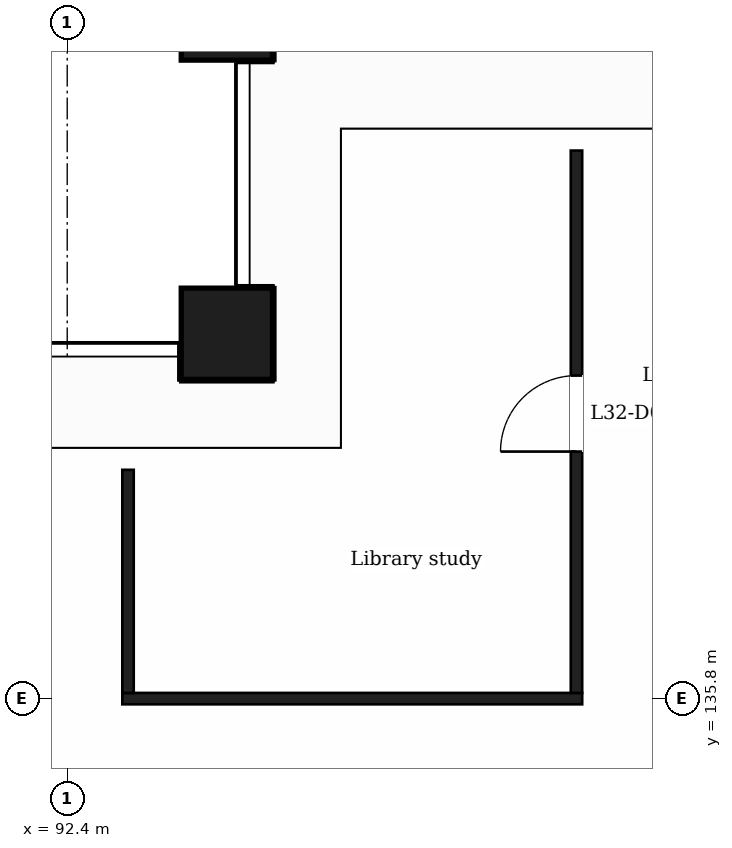
"""IFC4 building model, lengths in metres.
Left out: names, types, materials, properties, quantities, classifications, styles, units other than length and angle.
Written with IfcOpenShell. Run it as: python <this file> out.ifc"""

import sys

from ifc_helpers import new_model, si_unit, direction, frame, frame_2d, origin, origin_2d, place, context, subcontext, project, spatial, rectangle, extrude, element, fill, save


model = new_model("IFC4")
c1 = context("Model", 3, precision=1e-05, world=origin(), true_north=direction((0.0, 1.0)))
c2 = subcontext(c1, "Body", "Model", "MODEL_VIEW")
j1 = project(units=[si_unit("LENGTHUNIT", "METRE"), si_unit("PLANEANGLEUNIT", "RADIAN")], contexts=[c1])
p1 = place(None, origin())
s1 = spatial("IfcSite", under=j1, at=p1, CompositionType="ELEMENT")
p2 = place(p1, origin())
s2 = spatial("IfcBuilding", under=s1, at=p2, CompositionType="ELEMENT")
p3 = place(p2, frame((0.0, 0.0, 135.4)))
s3 = spatial("IfcBuildingStorey", under=s2, at=p3, CompositionType="ELEMENT", Elevation=135.4)
for number, where, z_axis, x_axis in (
    (1, (94.5, 140.6, 0.0), (0.0, 0.0, 1.0), (1.0, 0.0, 0.0)),
    (2, (94.5, 144.8, 0.0), (0.0, 0.0, 1.0), (1.0, 0.0, 0.0)),
):
    element("IfcColumn", number, at=place(p3, frame(where, z_axis=z_axis, x_axis=x_axis)), inside=s3, PredefinedType="COLUMN", context=c2, shape_type="SweptSolid", body=[
        extrude(rectangle(XDim=1.2, YDim=1.2, at=origin_2d()), origin(), (0.0, 0.0, 1.0), 7.4),
    ])
p4 = place(p3, frame((93.125, 135.8, 0.0), z_axis=(0.0, 0.0, 1.0), x_axis=(1.0, 0.0, 0.0)))
e3 = element("IfcWall", 3, at=p4, inside=s3, PredefinedType="PARTITIONING", context=c2, shape_type="SweptSolid", body=[
    extrude(rectangle(XDim=6.05, YDim=0.15, at=frame_2d((3.025, 0.0))), origin(), (0.0, 0.0, 1.0), 6.9),
])
p5 = place(p3, frame((93.2, 135.875, 0.0), z_axis=(0.0, 0.0, 1.0), x_axis=(0.0, 1.0, 0.0)))
e4 = element("IfcWall", 4, at=p5, inside=s3, PredefinedType="PARTITIONING", context=c2, shape_type="SweptSolid", body=[
    extrude(rectangle(XDim=2.935, YDim=0.15, at=frame_2d((1.468, 0.0))), origin(), (0.0, 0.0, 1.0), 6.9),
])
p6 = place(p3, frame((99.1, 135.875, 0.0), z_axis=(0.0, 0.0, 1.0), x_axis=(0.0, 1.0, 0.0)))
e5 = element("IfcWall", 5, at=p6, inside=s3, PredefinedType="PARTITIONING", context=c2, shape_type="SweptSolid", body=[
    extrude(rectangle(XDim=7.135, YDim=0.15, at=frame_2d((3.567, 0.0))), origin(), (0.0, 0.0, 1.0), 6.9),
])
p7 = place(p6, frame((3.175, 0.0, 0.0)))
e6 = element("IfcOpeningElement", 6, at=p7, cuts=e5, PredefinedType="OPENING", context=c2, shape_type="SweptSolid", body=[
    extrude(rectangle(XDim=1.0, YDim=2.1, at=frame_2d((0.5, 1.05))), frame((0.0, 0.085, 0.0), z_axis=(0.0, -1.0, 0.0), x_axis=(1.0, 0.0, 0.0)), (0.0, 0.0, 1.0), 0.17),
])
p8 = place(p7, origin())
e7 = element("IfcDoor", 7, at=p8, inside=s3, OperationType="SINGLE_SWING_LEFT", PredefinedType="DOOR", context=c2, shape_type="SweptSolid", body=[
    extrude(rectangle(XDim=1.0, YDim=2.1, at=frame_2d((0.5, 1.05))), frame((0.0, 0.025, 0.0), z_axis=(0.0, -1.0, 0.0), x_axis=(1.0, 0.0, 0.0)), (0.0, 0.0, 1.0), 0.05),
])
fill(e6, e7)
save(model, sys.argv[1])
